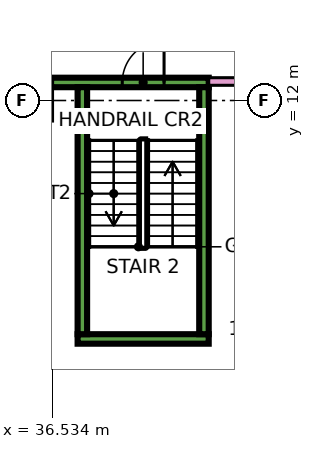
"""IFC4 building model, lengths in metres.
Left out: names, types, materials, properties, quantities, classifications, styles, units other than length and angle.
Written with IfcOpenShell. Run it as: python <this file> out.ifc"""

import sys

from ifc_helpers import new_model, si_unit, direction, frame, frame_2d, origin, place, context, subcontext, project, spatial, rectangle, extrude, element, fill, save


model = new_model("IFC4")
c1 = context("Model", 3, precision=1e-05, world=origin(), true_north=direction((0.0, 1.0)))
c2 = subcontext(c1, "Body", "Model", "MODEL_VIEW")
j1 = project(units=[si_unit("LENGTHUNIT", "METRE"), si_unit("PLANEANGLEUNIT", "RADIAN")], contexts=[c1])
p1 = place(None, origin())
s1 = spatial("IfcSite", under=j1, at=p1, CompositionType="ELEMENT")
p2 = place(p1, origin())
s2 = spatial("IfcBuilding", under=s1, at=p2, CompositionType="ELEMENT")
p3 = place(p2, frame((0.0, 0.0, 133.15)))
s3 = spatial("IfcBuildingStorey", under=s2, at=p3, CompositionType="ELEMENT", Elevation=133.15)
p4 = place(p3, frame((37.2, 5.725, 0.0), z_axis=(0.0, 0.0, 1.0), x_axis=(1.0, 0.0, 0.0)))
e1 = element("IfcWall", 1, at=p4, inside=s3, PredefinedType="SHEAR", context=c2, shape_type="SweptSolid", body=[
    extrude(rectangle(XDim=3.45, YDim=0.25, at=frame_2d((1.725, 0.0))), origin(), (0.0, 0.0, 1.0), 3.75),
])
p5 = place(p3, frame((36.5, 12.475, 0.0), z_axis=(0.0, 0.0, 1.0), x_axis=(1.0, 0.0, 0.0)))
e2 = element("IfcWall", 2, at=p5, inside=s3, PredefinedType="SHEAR", context=c2, shape_type="SweptSolid", body=[
    extrude(rectangle(XDim=4.15, YDim=0.25, at=frame_2d((2.075, 0.0))), origin(), (0.0, 0.0, 1.0), 3.75),
])
p6 = place(p5, frame((1.875, 0.0, 0.0)))
e3 = element("IfcOpeningElement", 3, at=p6, cuts=e2, PredefinedType="OPENING", context=c2, shape_type="SweptSolid", body=[
    extrude(rectangle(XDim=1.1, YDim=2.2, at=frame_2d((0.55, 1.1))), frame((0.0, 0.135, 0.0), z_axis=(0.0, -1.0, 0.0), x_axis=(1.0, 0.0, 0.0)), (0.0, 0.0, 1.0), 0.27),
])
for number, where, z_axis, x_axis in (
    (4, (37.325, 5.85, 0.0), (0.0, 0.0, 1.0), (0.0, 1.0, 0.0)),
    (5, (40.525, 5.85, 0.0), (0.0, 0.0, 1.0), (0.0, 1.0, 0.0)),
):
    element("IfcWall", number, at=place(p3, frame(where, z_axis=z_axis, x_axis=x_axis)), inside=s3, PredefinedType="SHEAR", context=c2, shape_type="SweptSolid", body=[
        extrude(rectangle(XDim=6.5, YDim=0.25, at=frame_2d((3.25, 0.0))), origin(), (0.0, 0.0, 1.0), 3.75),
    ])
p7 = place(p3, frame((40.65, 12.5, 0.0), z_axis=(0.0, 0.0, 1.0), x_axis=(1.0, 0.0, 0.0)))
e6 = element("IfcWall", 6, at=p7, inside=s3, PredefinedType="PARTITIONING", context=c2, shape_type="SweptSolid", body=[
    extrude(rectangle(XDim=31.276, YDim=0.2, at=frame_2d((15.638, 0.0))), origin(), (0.0, 0.0, 1.0), 3.35),
])
p8 = place(p7, frame((29.1, 0.0, 0.0)))
e7 = element("IfcOpeningElement", 7, at=p8, cuts=e6, PredefinedType="OPENING", context=c2, shape_type="SweptSolid", body=[
    extrude(rectangle(XDim=1.0, YDim=2.1, at=frame_2d((0.5, 1.05))), frame((0.0, 0.11, 0.0), z_axis=(0.0, -1.0, 0.0), x_axis=(1.0, 0.0, 0.0)), (0.0, 0.0, 1.0), 0.22),
])
p9 = place(p7, frame((1.05, 0.0, 0.0)))
e8 = element("IfcOpeningElement", 8, at=p9, cuts=e6, PredefinedType="OPENING", context=c2, shape_type="SweptSolid", body=[
    extrude(rectangle(XDim=1.0, YDim=2.1, at=frame_2d((0.5, 1.05))), frame((0.0, 0.11, 0.0), z_axis=(0.0, -1.0, 0.0), x_axis=(1.0, 0.0, 0.0)), (0.0, 0.0, 1.0), 0.22),
])
p10 = place(p6, frame((1.1, 0.0, 0.0), z_axis=(0.0, 0.0, 1.0), x_axis=(-1.0, 0.0, 0.0)))
e9 = element("IfcDoor", 9, at=p10, inside=s3, OperationType="SINGLE_SWING_RIGHT", PredefinedType="DOOR", context=c2, shape_type="SweptSolid", body=[
    extrude(rectangle(XDim=1.1, YDim=2.2, at=frame_2d((0.55, 1.1))), frame((0.0, 0.025, 0.0), z_axis=(0.0, -1.0, 0.0), x_axis=(1.0, 0.0, 0.0)), (0.0, 0.0, 1.0), 0.05),
])
fill(e3, e9)
save(model, sys.argv[1])
